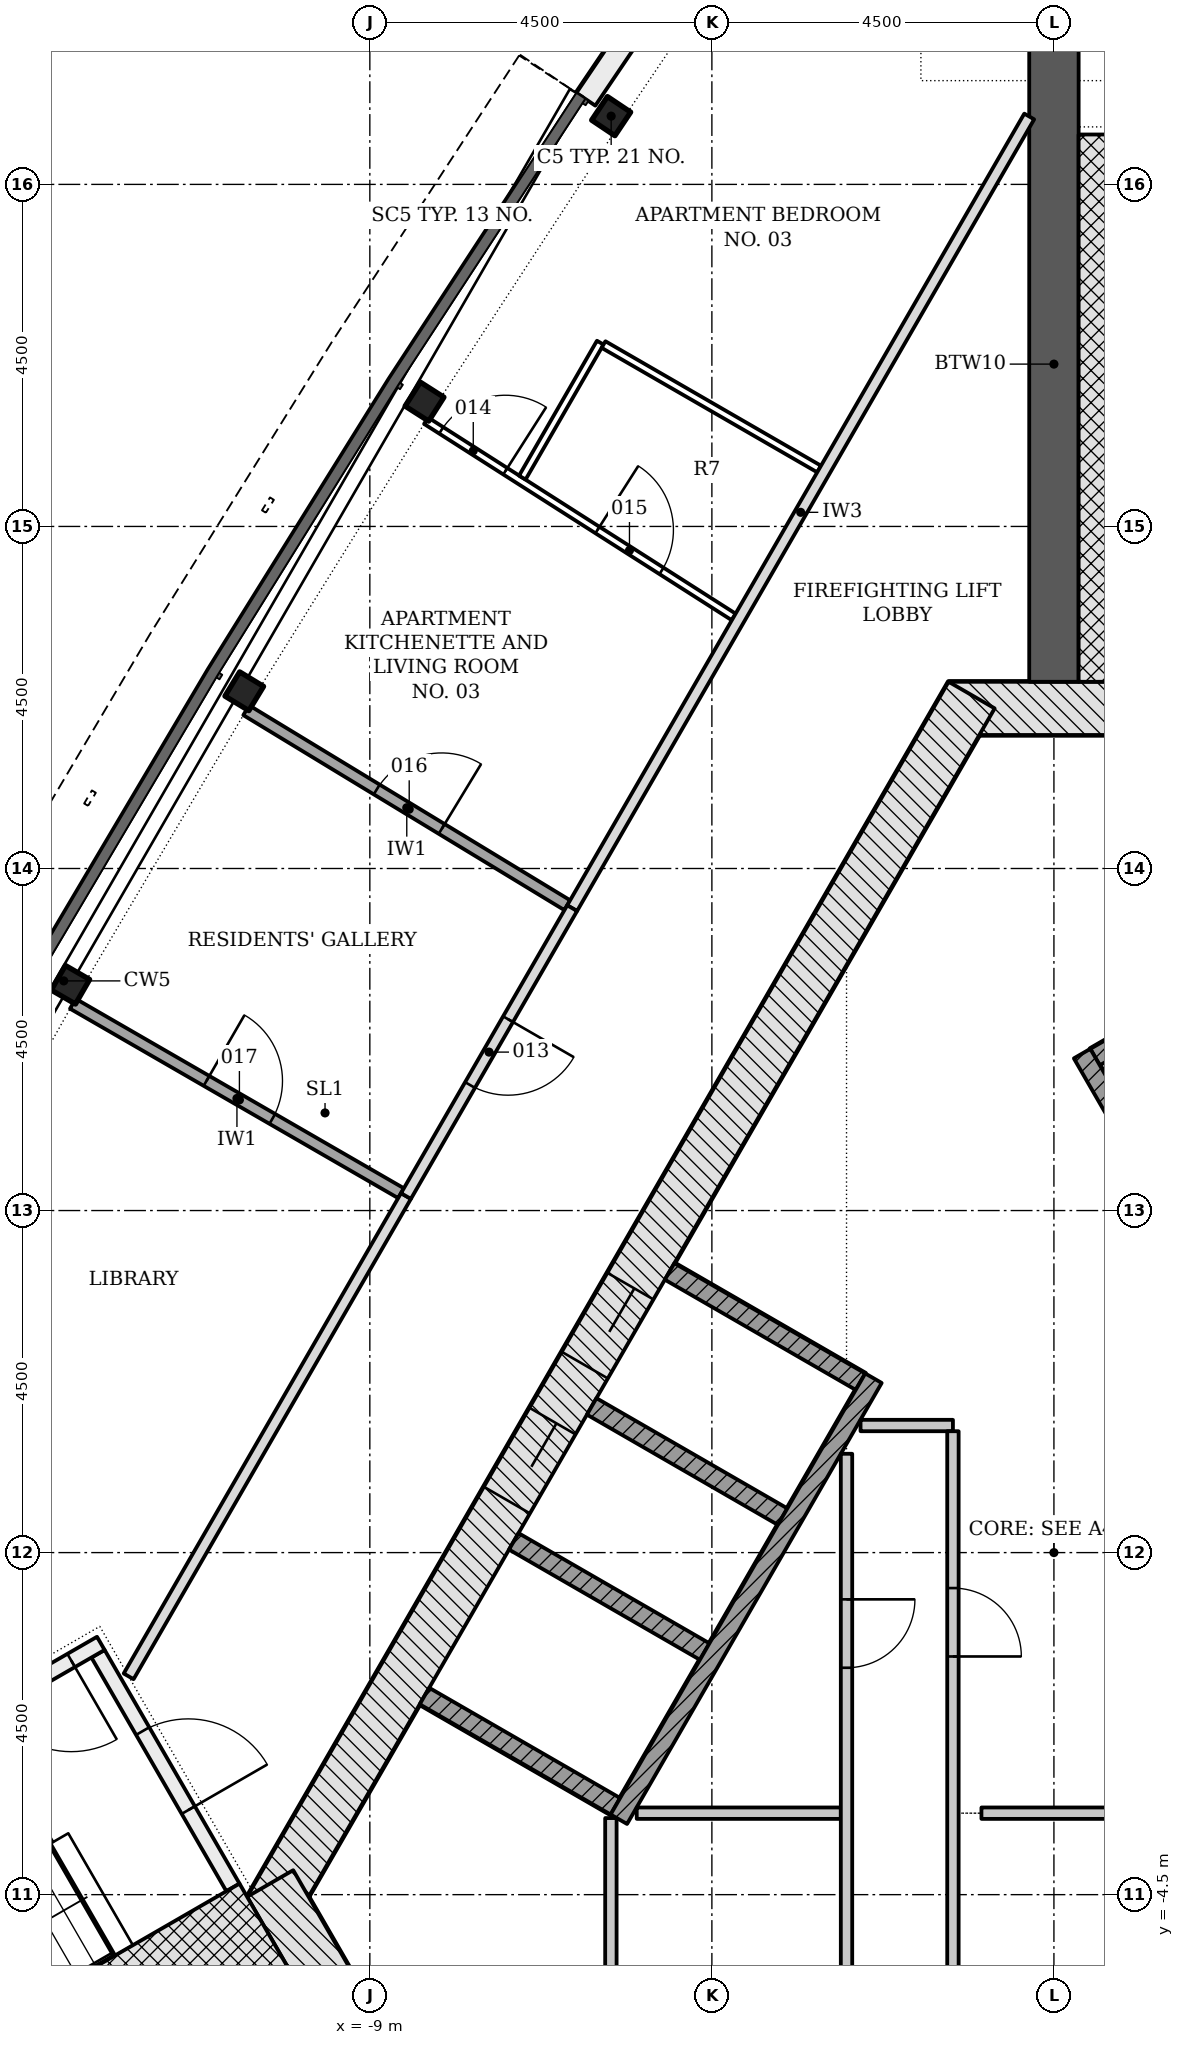
"""IFC4 building model, lengths in metres.
Left out: names, types, materials, properties, quantities, classifications, styles, units other than length and angle.
Written with IfcOpenShell. Run it as: python <this file> out.ifc"""

import sys

from ifc_helpers import new_model, si_unit, direction, frame, frame_2d, origin, origin_2d, place, context, subcontext, project, spatial, polyline, rectangle, i_section, outline, extrude, element, fill, save


model = new_model("IFC4")
c1 = context("Model", 3, precision=1e-05, world=origin(), true_north=direction((0.0, 1.0)))
c2 = subcontext(c1, "Body", "Model", "MODEL_VIEW")
j1 = project(units=[si_unit("LENGTHUNIT", "METRE"), si_unit("PLANEANGLEUNIT", "RADIAN")], contexts=[c1])
p1 = place(None, origin())
s1 = spatial("IfcSite", under=j1, at=p1, CompositionType="ELEMENT")
p2 = place(p1, origin())
s2 = spatial("IfcBuilding", under=s1, at=p2, CompositionType="ELEMENT")
p3 = place(p2, frame((0.0, 0.0, 214.8)))
s3 = spatial("IfcBuildingStorey", under=s2, at=p3, CompositionType="ELEMENT", Elevation=214.8)
p4 = place(p3, frame((1.386, 11.106, -0.2), z_axis=(0.0, 0.0, 1.0), x_axis=(-1.0, 0.0, 0.0)))
e1 = element("IfcWall", 1, at=p4, inside=s3, PredefinedType="SHEAR", context=c2, shape_type="SweptSolid", body=[
    extrude(rectangle(XDim=2.771, YDim=0.7, at=frame_2d((1.386, 0.0))), origin(), (0.0, 0.0, 1.0), 3.6),
])
p5 = place(p3, frame((-1.083, 11.281, -0.2), z_axis=(0.0, 0.0, 1.0), x_axis=(-0.500001446645, -0.866024568562, 0.0)))
e2 = element("IfcWall", 2, at=p5, inside=s3, PredefinedType="SHEAR", context=c2, shape_type="SweptSolid", body=[
    extrude(rectangle(XDim=18.458, YDim=0.7, at=frame_2d((9.229, 0.0))), origin(), (0.0, 0.0, 1.0), 3.6),
])
p6 = place(p5, frame((8.979, 0.0, 0.2)))
e3 = element("IfcOpeningElement", 3, at=p6, cuts=e2, PredefinedType="OPENING", context=c2, shape_type="SweptSolid", body=[
    extrude(rectangle(XDim=1.2, YDim=2.1, at=frame_2d((0.6, 1.05))), frame((0.0, 0.36, 0.0), z_axis=(0.0, -1.0, 0.0), x_axis=(1.0, 0.0, 0.0)), (0.0, 0.0, 1.0), 0.72),
])
p7 = place(p5, frame((11.029, 0.0, 0.2)))
e4 = element("IfcOpeningElement", 4, at=p7, cuts=e2, PredefinedType="OPENING", context=c2, shape_type="SweptSolid", body=[
    extrude(rectangle(XDim=1.2, YDim=2.1, at=frame_2d((0.6, 1.05))), frame((0.0, 0.36, 0.0), z_axis=(0.0, -1.0, 0.0), x_axis=(1.0, 0.0, 0.0)), (0.0, 0.0, 1.0), 0.72),
])
p8 = place(p3, frame((-10.311, -4.353, -0.2), z_axis=(0.0, 0.0, 1.0), x_axis=(0.500042739161, -0.866000726912, 0.0)))
e5 = element("IfcWall", 5, at=p8, inside=s3, PredefinedType="SHEAR", context=c2, shape_type="SweptSolid", body=[
    extrude(rectangle(XDim=2.771, YDim=0.7, at=frame_2d((1.386, 0.0))), origin(), (0.0, 0.0, 1.0), 3.6),
])
p9 = place(p3, frame((0.0, 11.456, -0.2), z_axis=(0.0, 0.0, 1.0), x_axis=(0.0, 1.0, 0.0)))
e6 = element("IfcWall", 6, at=p9, inside=s3, PredefinedType="SHEAR", context=c2, shape_type="SweptSolid", body=[
    extrude(rectangle(XDim=8.359, YDim=0.65, at=frame_2d((4.179, 0.0))), origin(), (0.0, 0.0, 1.0), 3.6),
])
for number, where, z_axis, x_axis in (
    (7, (-5.825, 18.898, -0.2), (0.0, 0.0, 1.0), (-0.556, -0.831, 0.0)),
    (8, (-8.281, 15.142, -0.2), (0.0, 0.0, 1.0), (-0.538, -0.843, 0.0)),
    (9, (-10.652, 11.332, -0.2), (0.0, 0.0, 1.0), (-0.519, -0.855, 0.0)),
    (10, (-12.939, 7.47, -0.2), (0.0, 0.0, 1.0), (-0.5, -0.866, 0.0)),
):
    element("IfcColumn", number, at=place(p3, frame(where, z_axis=z_axis, x_axis=x_axis)), inside=s3, PredefinedType="COLUMN", context=c2, shape_type="SweptSolid", body=[
        extrude(i_section(OverallWidth=0.373, OverallDepth=0.368, WebThickness=0.015, FlangeThickness=0.024, FilletRadius=0.015, at=origin_2d()), origin(), (0.0, 0.0, 1.0), 3.6),
    ])
p10 = place(p3, origin())
e11 = element("IfcWall", 11, at=p10, inside=s3, PredefinedType="NOTDEFINED", context=c2, shape_type="SweptSolid", body=[
    extrude(outline(polyline([(6.282, 19.204), (5.149, 20.879), (4.151, 22.013), (2.911, 22.874), (1.499, 23.412), (0.0, 23.595), (-1.499, 23.412), (-2.911, 22.874), (-4.151, 22.013), (-5.149, 20.879), (-6.282, 19.204), (-6.034, 19.036), (-4.911, 20.695), (-3.95, 21.787), (-2.77, 22.607), (-1.427, 23.119), (0.0, 23.293), (1.427, 23.119), (2.77, 22.607), (3.95, 21.787), (4.911, 20.695), (6.034, 19.036), (6.282, 19.204)])), origin(), (0.0, 0.0, 1.0), 3.3),
])
p11 = place(p3, frame((2.706, 7.769, -0.2), z_axis=(0.0, 0.0, 1.0), x_axis=(-0.866022959057, -0.500004234368, 0.0)))
e12 = element("IfcWall", 12, at=p11, inside=s3, PredefinedType="PARTITIONING", context=c2, shape_type="SweptSolid", body=[
    extrude(rectangle(XDim=2.5, YDim=0.25, at=frame_2d((1.25, 0.0))), origin(), (0.0, 0.0, 1.0), 3.6),
])
p12 = place(p3, frame((5.87, -2.961, 0.0), z_axis=(0.0, 0.0, 1.0), x_axis=(-0.50000615651, 0.866021849293, 0.0)))
e13 = element("IfcWall", 13, at=p12, inside=s3, PredefinedType="PARTITIONING", context=c2, shape_type="SweptSolid", body=[
    extrude(rectangle(XDim=11.0, YDim=0.25, at=frame_2d((5.5, 0.0))), origin(), (0.0, 0.0, 1.0), 3.4),
])
for number, where, z_axis, x_axis in (
    (14, (-5.056, 3.699, -0.2), (0.0, 0.0, 1.0), (0.866, -0.5, 0.0)),
    (15, (-6.081, 1.923, -0.2), (0.0, 0.0, 1.0), (0.866, -0.5, 0.0)),
    (16, (-7.106, 0.148, -0.2), (0.0, 0.0, 1.0), (0.866, -0.5, 0.0)),
    (17, (-8.281, -1.887, -0.2), (0.0, 0.0, 1.0), (0.866, -0.5, 0.0)),
):
    element("IfcWall", number, at=place(p3, frame(where, z_axis=z_axis, x_axis=x_axis)), inside=s3, PredefinedType="PARTITIONING", context=c2, shape_type="SweptSolid", body=[
        extrude(rectangle(XDim=2.9, YDim=0.25, at=frame_2d((1.45, 0.0))), origin(), (0.0, 0.0, 1.0), 3.6),
    ])
p13 = place(p3, frame((-2.374, 2.294, 0.0), z_axis=(0.0, 0.0, 1.0), x_axis=(-0.500003174267, -0.866023571113, 0.0)))
e18 = element("IfcWall", 18, at=p13, inside=s3, PredefinedType="PARTITIONING", context=c2, shape_type="SweptSolid", body=[
    extrude(rectangle(XDim=6.7, YDim=0.25, at=frame_2d((3.35, 0.0))), origin(), (0.0, 0.0, 1.0), 3.4),
])
p14 = place(p3, frame((-5.829, -3.492, 0.0), z_axis=(0.0, 0.0, 1.0), x_axis=(0.0, -1.0, 0.0)))
e19 = element("IfcWall", 19, at=p14, inside=s3, PredefinedType="PARTITIONING", context=c2, shape_type="SweptSolid", body=[
    extrude(rectangle(XDim=2.736, YDim=0.15, at=frame_2d((1.368, 0.0))), origin(), (0.0, 0.0, 1.0), 3.4),
])
p15 = place(p3, frame((-5.489, -3.428, 0.0), z_axis=(0.0, 0.0, 1.0), x_axis=(1.0, 0.0, 0.0)))
e20 = element("IfcWall", 20, at=p15, inside=s3, PredefinedType="PARTITIONING", context=c2, shape_type="SweptSolid", body=[
    extrude(rectangle(XDim=2.685, YDim=0.15, at=frame_2d((1.343, 0.0))), origin(), (0.0, 0.0, 1.0), 3.4),
])
p16 = place(p3, frame((-2.729, 1.3, 0.0), z_axis=(0.0, 0.0, 1.0), x_axis=(0.0, -1.0, 0.0)))
e21 = element("IfcWall", 21, at=p16, inside=s3, PredefinedType="PARTITIONING", context=c2, shape_type="SweptSolid", body=[
    extrude(rectangle(XDim=7.528, YDim=0.15, at=frame_2d((3.764, 0.0))), origin(), (0.0, 0.0, 1.0), 3.4),
])
p17 = place(p16, frame((1.915, 0.0, 0.0)))
e22 = element("IfcOpeningElement", 22, at=p17, cuts=e21, PredefinedType="OPENING", context=c2, shape_type="SweptSolid", body=[
    extrude(rectangle(XDim=0.9, YDim=2.1, at=frame_2d((0.45, 1.05))), frame((0.0, 0.085, 0.0), z_axis=(0.0, -1.0, 0.0), x_axis=(1.0, 0.0, 0.0)), (0.0, 0.0, 1.0), 0.17),
])
p18 = place(p3, frame((-2.544, 1.672, 0.0), z_axis=(0.0, 0.0, 1.0), x_axis=(1.0, 0.0, 0.0)))
e23 = element("IfcWall", 23, at=p18, inside=s3, PredefinedType="PARTITIONING", context=c2, shape_type="SweptSolid", body=[
    extrude(rectangle(XDim=1.216, YDim=0.15, at=frame_2d((0.608, 0.0))), origin(), (0.0, 0.0, 1.0), 3.4),
])
p19 = place(p3, frame((-1.329, 1.597, 0.0), z_axis=(0.0, 0.0, 1.0), x_axis=(0.0, -1.0, 0.0)))
e24 = element("IfcWall", 24, at=p19, inside=s3, PredefinedType="PARTITIONING", context=c2, shape_type="SweptSolid", body=[
    extrude(rectangle(XDim=7.825, YDim=0.15, at=frame_2d((3.913, 0.0))), origin(), (0.0, 0.0, 1.0), 3.4),
])
p20 = place(p19, frame((2.063, 0.0, 0.0)))
e25 = element("IfcOpeningElement", 25, at=p20, cuts=e24, PredefinedType="OPENING", context=c2, shape_type="SweptSolid", body=[
    extrude(rectangle(XDim=0.9, YDim=2.1, at=frame_2d((0.45, 1.05))), frame((0.0, 0.085, 0.0), z_axis=(0.0, -1.0, 0.0), x_axis=(1.0, 0.0, 0.0)), (0.0, 0.0, 1.0), 0.17),
])
p21 = place(p3, frame((-0.954, -3.428, 0.0), z_axis=(0.0, 0.0, 1.0), x_axis=(1.0, 0.0, 0.0)))
e26 = element("IfcWall", 26, at=p21, inside=s3, PredefinedType="PARTITIONING", context=c2, shape_type="SweptSolid", body=[
    extrude(rectangle(XDim=10.08, YDim=0.15, at=frame_2d((5.04, 0.0))), origin(), (0.0, 0.0, 1.0), 3.4),
])
p22 = place(p3, frame((0.955, 11.456, -0.2), z_axis=(0.0, 0.0, 1.0), x_axis=(0.0, 1.0, 0.0)))
e27 = element("IfcWall", 27, at=p22, inside=s3, PredefinedType="SHEAR", context=c2, shape_type="SweptSolid", body=[
    extrude(rectangle(XDim=7.2, YDim=1.261, at=frame_2d((3.6, 0.0))), origin(), (0.0, 0.0, 1.0), 3.6),
])
p23 = place(p3, frame((-12.576, -1.331, -0.2), z_axis=(0.0, 0.0, 1.0), x_axis=(0.499970499736, -0.8660424351, 0.0)))
e28 = element("IfcWall", 28, at=p23, inside=s3, PredefinedType="SHEAR", context=c2, shape_type="SweptSolid", body=[
    extrude(rectangle(XDim=3.55, YDim=0.2, at=frame_2d((1.775, 0.0))), origin(), (0.0, 0.0, 1.0), 3.6),
])
p24 = place(p23, frame((1.175, 0.0, 0.2)))
e29 = element("IfcOpeningElement", 29, at=p24, cuts=e28, PredefinedType="OPENING", context=c2, shape_type="SweptSolid", body=[
    extrude(rectangle(XDim=1.2, YDim=2.1, at=frame_2d((0.6, 1.05))), frame((0.0, 0.11, 0.0), z_axis=(0.0, -1.0, 0.0), x_axis=(1.0, 0.0, 0.0)), (0.0, 0.0, 1.0), 0.22),
])
p25 = place(p3, frame((-12.539, -1.194, -0.2), z_axis=(0.0, 0.0, 1.0), x_axis=(-0.866045472092, -0.499965239061, 0.0)))
e30 = element("IfcWall", 30, at=p25, inside=s3, PredefinedType="SHEAR", context=c2, shape_type="SweptSolid", body=[
    extrude(rectangle(XDim=5.6, YDim=0.2, at=frame_2d((2.8, 0.0))), origin(), (0.0, 0.0, 1.0), 3.6),
])
p26 = place(p25, frame((0.45, 0.0, 0.2)))
e31 = element("IfcOpeningElement", 31, at=p26, cuts=e30, PredefinedType="OPENING", context=c2, shape_type="SweptSolid", body=[
    extrude(rectangle(XDim=1.2, YDim=2.1, at=frame_2d((0.6, 1.05))), frame((0.0, 0.11, 0.0), z_axis=(0.0, -1.0, 0.0), x_axis=(1.0, 0.0, 0.0)), (0.0, 0.0, 1.0), 0.22),
])
p27 = place(p3, frame((-10.399, -4.901, -0.2), z_axis=(0.0, 0.0, 1.0), x_axis=(-0.866018442252, -0.500012057535, 0.0)))
e32 = element("IfcWall", 32, at=p27, inside=s3, PredefinedType="SHEAR", context=c2, shape_type="SweptSolid", body=[
    extrude(rectangle(XDim=7.2, YDim=1.261, at=frame_2d((3.6, 0.0))), origin(), (0.0, 0.0, 1.0), 3.6),
])
p28 = place(p3, frame((-0.325, 18.894, 0.0), z_axis=(0.0, 0.0, 1.0), x_axis=(-0.50000126085, -0.866024675831, 0.0)))
e33 = element("IfcWall", 33, at=p28, inside=s3, PredefinedType="PARTITIONING", context=c2, shape_type="SweptSolid", body=[
    extrude(rectangle(XDim=12.027, YDim=0.15, at=frame_2d((6.013, 0.0))), origin(), (0.0, 0.0, 1.0), 2.852),
])
p29 = place(p3, frame((-8.525, 4.691, 0.0), z_axis=(0.0, 0.0, 1.0), x_axis=(-0.499986021771, -0.866033473968, 0.0)))
e34 = element("IfcWall", 34, at=p29, inside=s3, PredefinedType="PARTITIONING", context=c2, shape_type="SweptSolid", body=[
    extrude(rectangle(XDim=7.297, YDim=0.15, at=frame_2d((3.648, 0.0))), origin(), (0.0, 0.0, 1.0), 2.852),
])
p30 = place(p3, frame((-10.626, 11.082, 0.0), z_axis=(0.0, 0.0, 1.0), x_axis=(0.854742891139, -0.519051625609, 0.0)))
e35 = element("IfcWall", 35, at=p30, inside=s3, PredefinedType="PARTITIONING", context=c2, shape_type="SweptSolid", body=[
    extrude(rectangle(XDim=4.941, YDim=0.15, at=frame_2d((2.471, 0.0))), origin(), (0.0, 0.0, 1.0), 3.4),
])
p31 = place(p30, frame((2.008, 0.0, 0.0)))
e36 = element("IfcOpeningElement", 36, at=p31, cuts=e35, PredefinedType="OPENING", context=c2, shape_type="SweptSolid", body=[
    extrude(rectangle(XDim=1.0, YDim=2.1, at=frame_2d((0.5, 1.05))), frame((0.0, 0.085, 0.0), z_axis=(0.0, -1.0, 0.0), x_axis=(1.0, 0.0, 0.0)), (0.0, 0.0, 1.0), 0.17),
])
p32 = place(p3, frame((-12.907, 7.221, 0.0), z_axis=(0.0, 0.0, 1.0), x_axis=(0.866031443676, -0.499989538455, 0.0)))
e37 = element("IfcWall", 37, at=p32, inside=s3, PredefinedType="PARTITIONING", context=c2, shape_type="SweptSolid", body=[
    extrude(rectangle(XDim=4.985, YDim=0.15, at=frame_2d((2.492, 0.0))), origin(), (0.0, 0.0, 1.0), 3.4),
])
p33 = place(p32, frame((2.03, 0.0, 0.0)))
e38 = element("IfcOpeningElement", 38, at=p33, cuts=e37, PredefinedType="OPENING", context=c2, shape_type="SweptSolid", body=[
    extrude(rectangle(XDim=1.0, YDim=2.1, at=frame_2d((0.5, 1.05))), frame((0.0, 0.085, 0.0), z_axis=(0.0, -1.0, 0.0), x_axis=(1.0, 0.0, 0.0)), (0.0, 0.0, 1.0), 0.17),
])
p34 = place(p3, frame((-6.338, 8.478, 0.0), z_axis=(0.0, 0.0, 1.0), x_axis=(-0.500005971936, -0.866021955858, 0.0)))
e39 = element("IfcWall", 39, at=p34, inside=s3, PredefinedType="PARTITIONING", context=c2, shape_type="SweptSolid", body=[
    extrude(rectangle(XDim=4.373, YDim=0.15, at=frame_2d((2.187, 0.0))), origin(), (0.0, 0.0, 1.0), 2.852),
])
p35 = place(p34, frame((1.687, 0.0, 0.0)))
e40 = element("IfcOpeningElement", 40, at=p35, cuts=e39, PredefinedType="OPENING", context=c2, shape_type="SweptSolid", body=[
    extrude(rectangle(XDim=1.0, YDim=2.1, at=frame_2d((0.5, 1.05))), frame((0.0, 0.085, 0.0), z_axis=(0.0, -1.0, 0.0), x_axis=(1.0, 0.0, 0.0)), (0.0, 0.0, 1.0), 0.17),
])
p36 = place(p3, frame((-8.26, 14.891, 0.0), z_axis=(0.0, 0.0, 1.0), x_axis=(0.843047331612, -0.537839378125, 0.0)))
e41 = element("IfcWall", 41, at=p36, inside=s3, PredefinedType="PARTITIONING", context=c2, shape_type="SweptSolid", body=[
    extrude(rectangle(XDim=4.8, YDim=0.1, at=frame_2d((2.4, 0.0))), origin(), (0.0, 0.0, 1.0), 3.4),
])
p37 = place(p36, frame((0.236, 0.0, 0.0)))
e42 = element("IfcOpeningElement", 42, at=p37, cuts=e41, PredefinedType="OPENING", context=c2, shape_type="SweptSolid", body=[
    extrude(rectangle(XDim=1.0, YDim=2.1, at=frame_2d((0.5, 1.05))), frame((0.0, 0.06, 0.0), z_axis=(0.0, -1.0, 0.0), x_axis=(1.0, 0.0, 0.0)), (0.0, 0.0, 1.0), 0.12),
])
p38 = place(p36, frame((2.674, 0.0, 0.0)))
e43 = element("IfcOpeningElement", 43, at=p38, cuts=e41, PredefinedType="OPENING", context=c2, shape_type="SweptSolid", body=[
    extrude(rectangle(XDim=1.0, YDim=2.1, at=frame_2d((0.5, 1.05))), frame((0.0, 0.06, 0.0), z_axis=(0.0, -1.0, 0.0), x_axis=(1.0, 0.0, 0.0)), (0.0, 0.0, 1.0), 0.12),
])
p39 = place(p3, frame((-6.994, 14.143, 0.0), z_axis=(0.0, 0.0, 1.0), x_axis=(0.500097020274, 0.865969381856, 0.0)))
e44 = element("IfcWall", 44, at=p39, inside=s3, PredefinedType="PARTITIONING", context=c2, shape_type="SweptSolid", body=[
    extrude(rectangle(XDim=2.05, YDim=0.1, at=frame_2d((1.025, 0.0))), origin(), (0.0, 0.0, 1.0), 2.852),
])
p40 = place(p3, frame((-5.926, 15.893, 0.0), z_axis=(0.0, 0.0, 1.0), x_axis=(0.866027924134, -0.499995634601, 0.0)))
e45 = element("IfcWall", 45, at=p40, inside=s3, PredefinedType="PARTITIONING", context=c2, shape_type="SweptSolid", body=[
    extrude(rectangle(XDim=3.275, YDim=0.1, at=frame_2d((1.637, 0.0))), origin(), (0.0, 0.0, 1.0), 3.4),
])
p41 = place(p6, origin())
e46 = element("IfcDoor", 46, at=p41, inside=s3, OperationType="DOUBLE_DOOR_SLIDING", PredefinedType="DOOR", context=c2, shape_type="SweptSolid", body=[
    extrude(rectangle(XDim=1.2, YDim=2.1, at=frame_2d((0.6, 1.05))), frame((0.0, 0.025, 0.0), z_axis=(0.0, -1.0, 0.0), x_axis=(1.0, 0.0, 0.0)), (0.0, 0.0, 1.0), 0.05),
])
fill(e3, e46)
p42 = place(p7, origin())
e47 = element("IfcDoor", 47, at=p42, inside=s3, OperationType="DOUBLE_DOOR_SLIDING", PredefinedType="DOOR", context=c2, shape_type="SweptSolid", body=[
    extrude(rectangle(XDim=1.2, YDim=2.1, at=frame_2d((0.6, 1.05))), frame((0.0, 0.025, 0.0), z_axis=(0.0, -1.0, 0.0), x_axis=(1.0, 0.0, 0.0)), (0.0, 0.0, 1.0), 0.05),
])
fill(e4, e47)
p43 = place(p17, origin())
e48 = element("IfcDoor", 48, at=p43, inside=s3, OperationType="SINGLE_SWING_LEFT", PredefinedType="DOOR", context=c2, shape_type="SweptSolid", body=[
    extrude(rectangle(XDim=0.9, YDim=2.1, at=frame_2d((0.45, 1.05))), frame((0.0, 0.025, 0.0), z_axis=(0.0, -1.0, 0.0), x_axis=(1.0, 0.0, 0.0)), (0.0, 0.0, 1.0), 0.05),
])
fill(e22, e48)
p44 = place(p20, origin())
e49 = element("IfcDoor", 49, at=p44, inside=s3, OperationType="SINGLE_SWING_RIGHT", PredefinedType="DOOR", context=c2, shape_type="SweptSolid", body=[
    extrude(rectangle(XDim=0.9, YDim=2.1, at=frame_2d((0.45, 1.05))), frame((0.0, 0.025, 0.0), z_axis=(0.0, -1.0, 0.0), x_axis=(1.0, 0.0, 0.0)), (0.0, 0.0, 1.0), 0.05),
])
fill(e25, e49)
p45 = place(p24, origin())
e50 = element("IfcDoor", 50, at=p45, inside=s3, OperationType="SINGLE_SWING_RIGHT", PredefinedType="DOOR", context=c2, shape_type="SweptSolid", body=[
    extrude(rectangle(XDim=1.2, YDim=2.1, at=frame_2d((0.6, 1.05))), frame((0.0, 0.025, 0.0), z_axis=(0.0, -1.0, 0.0), x_axis=(1.0, 0.0, 0.0)), (0.0, 0.0, 1.0), 0.05),
])
fill(e29, e50)
p46 = place(p26, origin())
e51 = element("IfcDoor", 51, at=p46, inside=s3, OperationType="SINGLE_SWING_LEFT", PredefinedType="DOOR", context=c2, shape_type="SweptSolid", body=[
    extrude(rectangle(XDim=1.2, YDim=2.1, at=frame_2d((0.6, 1.05))), frame((0.0, 0.025, 0.0), z_axis=(0.0, -1.0, 0.0), x_axis=(1.0, 0.0, 0.0)), (0.0, 0.0, 1.0), 0.05),
])
fill(e31, e51)
p47 = place(p35, origin())
e52 = element("IfcDoor", 52, at=p47, inside=s3, OperationType="SINGLE_SWING_LEFT", PredefinedType="DOOR", context=c2, shape_type="SweptSolid", body=[
    extrude(rectangle(XDim=1.0, YDim=2.1, at=frame_2d((0.5, 1.05))), frame((0.0, 0.025, 0.0), z_axis=(0.0, -1.0, 0.0), x_axis=(1.0, 0.0, 0.0)), (0.0, 0.0, 1.0), 0.05),
])
fill(e40, e52)
p48 = place(p37, origin())
e53 = element("IfcDoor", 53, at=p48, inside=s3, OperationType="SINGLE_SWING_RIGHT", PredefinedType="DOOR", context=c2, shape_type="SweptSolid", body=[
    extrude(rectangle(XDim=1.0, YDim=2.1, at=frame_2d((0.5, 1.05))), frame((0.0, 0.025, 0.0), z_axis=(0.0, -1.0, 0.0), x_axis=(1.0, 0.0, 0.0)), (0.0, 0.0, 1.0), 0.05),
])
fill(e42, e53)
p49 = place(p38, origin())
e54 = element("IfcDoor", 54, at=p49, inside=s3, OperationType="SINGLE_SWING_LEFT", PredefinedType="DOOR", context=c2, shape_type="SweptSolid", body=[
    extrude(rectangle(XDim=1.0, YDim=2.1, at=frame_2d((0.5, 1.05))), frame((0.0, 0.025, 0.0), z_axis=(0.0, -1.0, 0.0), x_axis=(1.0, 0.0, 0.0)), (0.0, 0.0, 1.0), 0.05),
])
fill(e43, e54)
p50 = place(p31, origin())
e55 = element("IfcDoor", 55, at=p50, inside=s3, OperationType="SINGLE_SWING_RIGHT", PredefinedType="DOOR", context=c2, shape_type="SweptSolid", body=[
    extrude(rectangle(XDim=1.0, YDim=2.1, at=frame_2d((0.5, 1.05))), frame((0.0, 0.025, 0.0), z_axis=(0.0, -1.0, 0.0), x_axis=(1.0, 0.0, 0.0)), (0.0, 0.0, 1.0), 0.05),
])
fill(e36, e55)
p51 = place(p33, origin())
e56 = element("IfcDoor", 56, at=p51, inside=s3, OperationType="SINGLE_SWING_LEFT", PredefinedType="DOOR", context=c2, shape_type="SweptSolid", body=[
    extrude(rectangle(XDim=1.0, YDim=2.1, at=frame_2d((0.5, 1.05))), frame((0.0, 0.025, 0.0), z_axis=(0.0, -1.0, 0.0), x_axis=(1.0, 0.0, 0.0)), (0.0, 0.0, 1.0), 0.05),
])
fill(e38, e56)
save(model, sys.argv[1])
